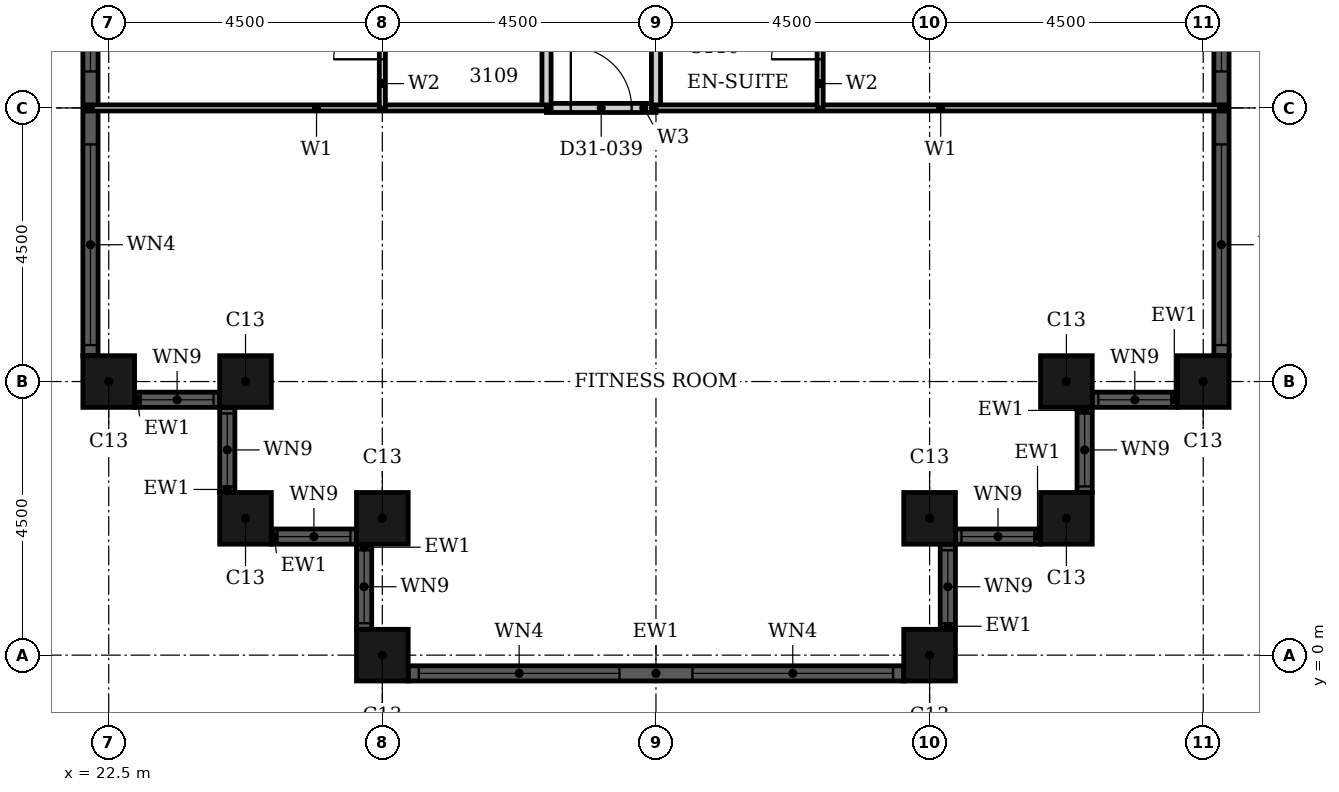
"""IFC4 building model, lengths in metres.
Left out: names, types, materials, properties, quantities, classifications, styles, units other than length and angle.
Written with IfcOpenShell. Run it as: python <this file> out.ifc"""

import sys

from ifc_helpers import new_model, si_unit, direction, frame, frame_2d, origin, origin_2d, place, context, subcontext, project, spatial, rectangle, hollow_rectangle, extrude, element, fill, save


model = new_model("IFC4")
c1 = context("Model", 3, precision=1e-05, world=origin(), true_north=direction((0.0, 1.0)))
c2 = subcontext(c1, "Body", "Model", "MODEL_VIEW")
j1 = project(units=[si_unit("LENGTHUNIT", "METRE"), si_unit("PLANEANGLEUNIT", "RADIAN")], contexts=[c1])
p1 = place(None, origin())
s1 = spatial("IfcSite", under=j1, at=p1, CompositionType="ELEMENT")
p2 = place(p1, origin())
s2 = spatial("IfcBuilding", under=s1, at=p2, CompositionType="ELEMENT")
p3 = place(p2, frame((0.0, 0.0, 126.0)))
s3 = spatial("IfcBuildingStorey", under=s2, at=p3, CompositionType="ELEMENT", Elevation=126.0)
for number, where, z_axis, x_axis in (
    (1, (22.5, 4.5, 0.0), (0.0, 0.0, 1.0), (1.0, 0.0, 0.0)),
    (2, (24.75, 4.5, 0.0), (0.0, 0.0, 1.0), (1.0, 0.0, 0.0)),
    (3, (24.75, 2.25, 0.0), (0.0, 0.0, 1.0), (1.0, 0.0, 0.0)),
    (4, (27.0, 2.25, 0.0), (0.0, 0.0, 1.0), (1.0, 0.0, 0.0)),
    (5, (27.0, 0.0, 0.0), (0.0, 0.0, 1.0), (1.0, 0.0, 0.0)),
    (6, (36.0, 0.0, 0.0), (0.0, 0.0, 1.0), (1.0, 0.0, 0.0)),
    (7, (36.0, 2.25, 0.0), (0.0, 0.0, 1.0), (1.0, 0.0, 0.0)),
    (8, (38.25, 2.25, 0.0), (0.0, 0.0, 1.0), (1.0, 0.0, 0.0)),
    (9, (38.25, 4.5, 0.0), (0.0, 0.0, 1.0), (1.0, 0.0, 0.0)),
    (10, (40.5, 4.5, 0.0), (0.0, 0.0, 1.0), (1.0, 0.0, 0.0)),
):
    element("IfcColumn", number, at=place(p3, frame(where, z_axis=z_axis, x_axis=x_axis)), inside=s3, PredefinedType="COLUMN", context=c2, shape_type="SweptSolid", body=[
        extrude(hollow_rectangle(XDim=0.85, YDim=0.85, WallThickness=0.026, at=origin_2d()), origin(), (0.0, 0.0, 1.0), 3.6),
    ])
p4 = place(p3, frame((22.925, 4.2, 0.0), z_axis=(0.0, 0.0, 1.0), x_axis=(1.0, 0.0, 0.0)))
e11 = element("IfcWall", 11, at=p4, inside=s3, PredefinedType="SOLIDWALL", context=c2, shape_type="SweptSolid", body=[
    extrude(rectangle(XDim=1.4, YDim=0.25, at=frame_2d((0.7, 0.0))), origin(), (0.0, 0.0, 1.0), 3.6),
])
p5 = place(p4, frame((0.1, 0.0, 0.9)))
e12 = element("IfcOpeningElement", 12, at=p5, cuts=e11, PredefinedType="OPENING", context=c2, shape_type="SweptSolid", body=[
    extrude(rectangle(XDim=1.2, YDim=2.08, at=frame_2d((0.6, 1.04))), frame((0.0, 0.135, 0.0), z_axis=(0.0, -1.0, 0.0), x_axis=(1.0, 0.0, 0.0)), (0.0, 0.0, 1.0), 0.27),
])
p6 = place(p3, frame((24.45, 4.075, 0.0), z_axis=(0.0, 0.0, 1.0), x_axis=(0.0, -1.0, 0.0)))
e13 = element("IfcWall", 13, at=p6, inside=s3, PredefinedType="SOLIDWALL", context=c2, shape_type="SweptSolid", body=[
    extrude(rectangle(XDim=1.4, YDim=0.25, at=frame_2d((0.7, 0.0))), origin(), (0.0, 0.0, 1.0), 3.6),
])
p7 = place(p6, frame((0.1, 0.0, 0.9)))
e14 = element("IfcOpeningElement", 14, at=p7, cuts=e13, PredefinedType="OPENING", context=c2, shape_type="SweptSolid", body=[
    extrude(rectangle(XDim=1.2, YDim=2.08, at=frame_2d((0.6, 1.04))), frame((0.0, 0.135, 0.0), z_axis=(0.0, -1.0, 0.0), x_axis=(1.0, 0.0, 0.0)), (0.0, 0.0, 1.0), 0.27),
])
p8 = place(p3, frame((25.175, 1.95, 0.0), z_axis=(0.0, 0.0, 1.0), x_axis=(1.0, 0.0, 0.0)))
e15 = element("IfcWall", 15, at=p8, inside=s3, PredefinedType="SOLIDWALL", context=c2, shape_type="SweptSolid", body=[
    extrude(rectangle(XDim=1.4, YDim=0.25, at=frame_2d((0.7, 0.0))), origin(), (0.0, 0.0, 1.0), 3.6),
])
p9 = place(p8, frame((0.1, 0.0, 0.9)))
e16 = element("IfcOpeningElement", 16, at=p9, cuts=e15, PredefinedType="OPENING", context=c2, shape_type="SweptSolid", body=[
    extrude(rectangle(XDim=1.2, YDim=2.08, at=frame_2d((0.6, 1.04))), frame((0.0, 0.135, 0.0), z_axis=(0.0, -1.0, 0.0), x_axis=(1.0, 0.0, 0.0)), (0.0, 0.0, 1.0), 0.27),
])
p10 = place(p3, frame((26.7, 1.825, 0.0), z_axis=(0.0, 0.0, 1.0), x_axis=(0.0, -1.0, 0.0)))
e17 = element("IfcWall", 17, at=p10, inside=s3, PredefinedType="SOLIDWALL", context=c2, shape_type="SweptSolid", body=[
    extrude(rectangle(XDim=1.4, YDim=0.25, at=frame_2d((0.7, 0.0))), origin(), (0.0, 0.0, 1.0), 3.6),
])
p11 = place(p10, frame((0.1, 0.0, 0.9)))
e18 = element("IfcOpeningElement", 18, at=p11, cuts=e17, PredefinedType="OPENING", context=c2, shape_type="SweptSolid", body=[
    extrude(rectangle(XDim=1.2, YDim=2.08, at=frame_2d((0.6, 1.04))), frame((0.0, 0.135, 0.0), z_axis=(0.0, -1.0, 0.0), x_axis=(1.0, 0.0, 0.0)), (0.0, 0.0, 1.0), 0.27),
])
p12 = place(p3, frame((27.425, -0.3, 0.0), z_axis=(0.0, 0.0, 1.0), x_axis=(1.0, 0.0, 0.0)))
e19 = element("IfcWall", 19, at=p12, inside=s3, PredefinedType="SOLIDWALL", context=c2, shape_type="SweptSolid", body=[
    extrude(rectangle(XDim=8.15, YDim=0.25, at=frame_2d((4.075, 0.0))), origin(), (0.0, 0.0, 1.0), 3.6),
])
p13 = place(p12, frame((0.175, 0.0, 0.9)))
e20 = element("IfcOpeningElement", 20, at=p13, cuts=e19, PredefinedType="OPENING", context=c2, shape_type="SweptSolid", body=[
    extrude(rectangle(XDim=3.3, YDim=2.08, at=frame_2d((1.65, 1.04))), frame((0.0, 0.135, 0.0), z_axis=(0.0, -1.0, 0.0), x_axis=(1.0, 0.0, 0.0)), (0.0, 0.0, 1.0), 0.27),
])
p14 = place(p12, frame((4.675, 0.0, 0.9)))
e21 = element("IfcOpeningElement", 21, at=p14, cuts=e19, PredefinedType="OPENING", context=c2, shape_type="SweptSolid", body=[
    extrude(rectangle(XDim=3.3, YDim=2.08, at=frame_2d((1.65, 1.04))), frame((0.0, 0.135, 0.0), z_axis=(0.0, -1.0, 0.0), x_axis=(1.0, 0.0, 0.0)), (0.0, 0.0, 1.0), 0.27),
])
p15 = place(p3, frame((36.3, 0.425, 0.0), z_axis=(0.0, 0.0, 1.0), x_axis=(0.0, 1.0, 0.0)))
e22 = element("IfcWall", 22, at=p15, inside=s3, PredefinedType="SOLIDWALL", context=c2, shape_type="SweptSolid", body=[
    extrude(rectangle(XDim=1.4, YDim=0.25, at=frame_2d((0.7, 0.0))), origin(), (0.0, 0.0, 1.0), 3.6),
])
p16 = place(p15, frame((0.1, 0.0, 0.9)))
e23 = element("IfcOpeningElement", 23, at=p16, cuts=e22, PredefinedType="OPENING", context=c2, shape_type="SweptSolid", body=[
    extrude(rectangle(XDim=1.2, YDim=2.08, at=frame_2d((0.6, 1.04))), frame((0.0, 0.135, 0.0), z_axis=(0.0, -1.0, 0.0), x_axis=(1.0, 0.0, 0.0)), (0.0, 0.0, 1.0), 0.27),
])
p17 = place(p3, frame((36.425, 1.95, 0.0), z_axis=(0.0, 0.0, 1.0), x_axis=(1.0, 0.0, 0.0)))
e24 = element("IfcWall", 24, at=p17, inside=s3, PredefinedType="SOLIDWALL", context=c2, shape_type="SweptSolid", body=[
    extrude(rectangle(XDim=1.4, YDim=0.25, at=frame_2d((0.7, 0.0))), origin(), (0.0, 0.0, 1.0), 3.6),
])
p18 = place(p17, frame((0.1, 0.0, 0.9)))
e25 = element("IfcOpeningElement", 25, at=p18, cuts=e24, PredefinedType="OPENING", context=c2, shape_type="SweptSolid", body=[
    extrude(rectangle(XDim=1.2, YDim=2.08, at=frame_2d((0.6, 1.04))), frame((0.0, 0.135, 0.0), z_axis=(0.0, -1.0, 0.0), x_axis=(1.0, 0.0, 0.0)), (0.0, 0.0, 1.0), 0.27),
])
p19 = place(p3, frame((38.55, 2.675, 0.0), z_axis=(0.0, 0.0, 1.0), x_axis=(0.0, 1.0, 0.0)))
e26 = element("IfcWall", 26, at=p19, inside=s3, PredefinedType="SOLIDWALL", context=c2, shape_type="SweptSolid", body=[
    extrude(rectangle(XDim=1.4, YDim=0.25, at=frame_2d((0.7, 0.0))), origin(), (0.0, 0.0, 1.0), 3.6),
])
p20 = place(p19, frame((0.1, 0.0, 0.9)))
e27 = element("IfcOpeningElement", 27, at=p20, cuts=e26, PredefinedType="OPENING", context=c2, shape_type="SweptSolid", body=[
    extrude(rectangle(XDim=1.2, YDim=2.08, at=frame_2d((0.6, 1.04))), frame((0.0, 0.135, 0.0), z_axis=(0.0, -1.0, 0.0), x_axis=(1.0, 0.0, 0.0)), (0.0, 0.0, 1.0), 0.27),
])
p21 = place(p3, frame((38.675, 4.2, 0.0), z_axis=(0.0, 0.0, 1.0), x_axis=(1.0, 0.0, 0.0)))
e28 = element("IfcWall", 28, at=p21, inside=s3, PredefinedType="SOLIDWALL", context=c2, shape_type="SweptSolid", body=[
    extrude(rectangle(XDim=1.4, YDim=0.25, at=frame_2d((0.7, 0.0))), origin(), (0.0, 0.0, 1.0), 3.6),
])
p22 = place(p21, frame((0.1, 0.0, 0.9)))
e29 = element("IfcOpeningElement", 29, at=p22, cuts=e28, PredefinedType="OPENING", context=c2, shape_type="SweptSolid", body=[
    extrude(rectangle(XDim=1.2, YDim=2.08, at=frame_2d((0.6, 1.04))), frame((0.0, 0.135, 0.0), z_axis=(0.0, -1.0, 0.0), x_axis=(1.0, 0.0, 0.0)), (0.0, 0.0, 1.0), 0.27),
])
p23 = place(p3, frame((40.8, 4.925, 0.0), z_axis=(0.0, 0.0, 1.0), x_axis=(0.0, 1.0, 0.0)))
e30 = element("IfcWall", 30, at=p23, inside=s3, PredefinedType="SOLIDWALL", context=c2, shape_type="SweptSolid", body=[
    extrude(rectangle(XDim=8.15, YDim=0.25, at=frame_2d((4.075, 0.0))), origin(), (0.0, 0.0, 1.0), 3.6),
])
p24 = place(p23, frame((0.175, 0.0, 0.9)))
e31 = element("IfcOpeningElement", 31, at=p24, cuts=e30, PredefinedType="OPENING", context=c2, shape_type="SweptSolid", body=[
    extrude(rectangle(XDim=3.3, YDim=2.08, at=frame_2d((1.65, 1.04))), frame((0.0, 0.135, 0.0), z_axis=(0.0, -1.0, 0.0), x_axis=(1.0, 0.0, 0.0)), (0.0, 0.0, 1.0), 0.27),
])
p25 = place(p23, frame((4.675, 0.0, 0.9)))
e32 = element("IfcOpeningElement", 32, at=p25, cuts=e30, PredefinedType="OPENING", context=c2, shape_type="SweptSolid", body=[
    extrude(rectangle(XDim=3.3, YDim=2.08, at=frame_2d((1.65, 1.04))), frame((0.0, 0.135, 0.0), z_axis=(0.0, -1.0, 0.0), x_axis=(1.0, 0.0, 0.0)), (0.0, 0.0, 1.0), 0.27),
])
p26 = place(p3, frame((22.2, 13.075, 0.0), z_axis=(0.0, 0.0, 1.0), x_axis=(0.0, -1.0, 0.0)))
e33 = element("IfcWall", 33, at=p26, inside=s3, PredefinedType="SOLIDWALL", context=c2, shape_type="SweptSolid", body=[
    extrude(rectangle(XDim=8.15, YDim=0.25, at=frame_2d((4.075, 0.0))), origin(), (0.0, 0.0, 1.0), 3.6),
])
p27 = place(p26, frame((0.175, 0.0, 0.9)))
e34 = element("IfcOpeningElement", 34, at=p27, cuts=e33, PredefinedType="OPENING", context=c2, shape_type="SweptSolid", body=[
    extrude(rectangle(XDim=3.3, YDim=2.08, at=frame_2d((1.65, 1.04))), frame((0.0, 0.135, 0.0), z_axis=(0.0, -1.0, 0.0), x_axis=(1.0, 0.0, 0.0)), (0.0, 0.0, 1.0), 0.27),
])
p28 = place(p26, frame((4.675, 0.0, 0.9)))
e35 = element("IfcOpeningElement", 35, at=p28, cuts=e33, PredefinedType="OPENING", context=c2, shape_type="SweptSolid", body=[
    extrude(rectangle(XDim=3.3, YDim=2.08, at=frame_2d((1.65, 1.04))), frame((0.0, 0.135, 0.0), z_axis=(0.0, -1.0, 0.0), x_axis=(1.0, 0.0, 0.0)), (0.0, 0.0, 1.0), 0.27),
])
p29 = place(p3, frame((29.7, 9.0, 0.0), z_axis=(0.0, 0.0, 1.0), x_axis=(1.0, 0.0, 0.0)))
e36 = element("IfcWall", 36, at=p29, inside=s3, PredefinedType="PARTITIONING", context=c2, shape_type="SweptSolid", body=[
    extrude(rectangle(XDim=1.8, YDim=0.15, at=frame_2d((0.9, 0.0))), origin(), (0.0, 0.0, 1.0), 3.3),
])
p30 = place(p29, frame((0.4, 0.0, 0.0)))
e37 = element("IfcOpeningElement", 37, at=p30, cuts=e36, PredefinedType="OPENING", context=c2, shape_type="SweptSolid", body=[
    extrude(rectangle(XDim=1.0, YDim=2.1, at=frame_2d((0.5, 1.05))), frame((0.0, 0.085, 0.0), z_axis=(0.0, -1.0, 0.0), x_axis=(1.0, 0.0, 0.0)), (0.0, 0.0, 1.0), 0.17),
])
p31 = place(p3, frame((29.7, 9.0, 0.0), z_axis=(0.0, 0.0, 1.0), x_axis=(0.0, 1.0, 0.0)))
e38 = element("IfcWall", 38, at=p31, inside=s3, PredefinedType="PARTITIONING", context=c2, shape_type="SweptSolid", body=[
    extrude(rectangle(XDim=11.7, YDim=0.15, at=frame_2d((5.85, 0.0))), origin(), (0.0, 0.0, 1.0), 3.3),
])
p32 = place(p31, frame((2.95, 0.0, 0.0)))
e39 = element("IfcOpeningElement", 39, at=p32, cuts=e38, PredefinedType="OPENING", context=c2, shape_type="SweptSolid", body=[
    extrude(rectangle(XDim=1.0, YDim=2.1, at=frame_2d((0.5, 1.05))), frame((0.0, 0.085, 0.0), z_axis=(0.0, -1.0, 0.0), x_axis=(1.0, 0.0, 0.0)), (0.0, 0.0, 1.0), 0.17),
])
p33 = place(p3, frame((31.5, 9.0, 0.0), z_axis=(0.0, 0.0, 1.0), x_axis=(0.0, 1.0, 0.0)))
e40 = element("IfcWall", 40, at=p33, inside=s3, PredefinedType="PARTITIONING", context=c2, shape_type="SweptSolid", body=[
    extrude(rectangle(XDim=11.7, YDim=0.15, at=frame_2d((5.85, 0.0))), origin(), (0.0, 0.0, 1.0), 2.58),
])
p34 = place(p33, frame((2.95, 0.0, 0.0)))
e41 = element("IfcOpeningElement", 41, at=p34, cuts=e40, PredefinedType="OPENING", context=c2, shape_type="SweptSolid", body=[
    extrude(rectangle(XDim=1.0, YDim=2.1, at=frame_2d((0.5, 1.05))), frame((0.0, 0.085, 0.0), z_axis=(0.0, -1.0, 0.0), x_axis=(1.0, 0.0, 0.0)), (0.0, 0.0, 1.0), 0.17),
])
p35 = place(p3, frame((31.5, 9.0, 0.0), z_axis=(0.0, 0.0, 1.0), x_axis=(1.0, 0.0, 0.0)))
e42 = element("IfcWall", 42, at=p35, inside=s3, PredefinedType="PARTITIONING", context=c2, shape_type="SweptSolid", body=[
    extrude(rectangle(XDim=9.365, YDim=0.1, at=frame_2d((4.683, 0.0))), origin(), (0.0, 0.0, 1.0), 3.3),
])
p36 = place(p3, frame((22.135, 9.0, 0.0), z_axis=(0.0, 0.0, 1.0), x_axis=(1.0, 0.0, 0.0)))
e43 = element("IfcWall", 43, at=p36, inside=s3, PredefinedType="PARTITIONING", context=c2, shape_type="SweptSolid", body=[
    extrude(rectangle(XDim=7.565, YDim=0.1, at=frame_2d((3.782, 0.0))), origin(), (0.0, 0.0, 1.0), 3.3),
])
p37 = place(p3, frame((27.0, 9.0, 0.0), z_axis=(0.0, 0.0, 1.0), x_axis=(0.0, 1.0, 0.0)))
e44 = element("IfcWall", 44, at=p37, inside=s3, PredefinedType="PARTITIONING", context=c2, shape_type="SweptSolid", body=[
    extrude(rectangle(XDim=2.4, YDim=0.1, at=frame_2d((1.2, 0.0))), origin(), (0.0, 0.0, 1.0), 2.58),
])
p38 = place(p37, frame((0.8, 0.0, 0.0)))
e45 = element("IfcOpeningElement", 45, at=p38, cuts=e44, PredefinedType="OPENING", context=c2, shape_type="SweptSolid", body=[
    extrude(rectangle(XDim=0.8, YDim=2.1, at=frame_2d((0.4, 1.05))), frame((0.0, 0.06, 0.0), z_axis=(0.0, -1.0, 0.0), x_axis=(1.0, 0.0, 0.0)), (0.0, 0.0, 1.0), 0.12),
])
p39 = place(p3, frame((34.2, 9.0, 0.0), z_axis=(0.0, 0.0, 1.0), x_axis=(0.0, 1.0, 0.0)))
e46 = element("IfcWall", 46, at=p39, inside=s3, PredefinedType="PARTITIONING", context=c2, shape_type="SweptSolid", body=[
    extrude(rectangle(XDim=2.4, YDim=0.1, at=frame_2d((1.2, 0.0))), origin(), (0.0, 0.0, 1.0), 3.3),
])
p40 = place(p39, frame((0.8, 0.0, 0.0)))
e47 = element("IfcOpeningElement", 47, at=p40, cuts=e46, PredefinedType="OPENING", context=c2, shape_type="SweptSolid", body=[
    extrude(rectangle(XDim=0.8, YDim=2.1, at=frame_2d((0.4, 1.05))), frame((0.0, 0.06, 0.0), z_axis=(0.0, -1.0, 0.0), x_axis=(1.0, 0.0, 0.0)), (0.0, 0.0, 1.0), 0.12),
])
p41 = place(p5, origin())
e48 = element("IfcWindow", 48, at=p41, inside=s3, PartitioningType="SINGLE_PANEL", PredefinedType="WINDOW", context=c2, shape_type="SweptSolid", body=[
    extrude(rectangle(XDim=1.2, YDim=2.08, at=frame_2d((0.6, 1.04))), frame((0.0, 0.03, 0.0), z_axis=(0.0, -1.0, 0.0), x_axis=(1.0, 0.0, 0.0)), (0.0, 0.0, 1.0), 0.06),
])
fill(e12, e48)
p42 = place(p7, origin())
e49 = element("IfcWindow", 49, at=p42, inside=s3, PartitioningType="SINGLE_PANEL", PredefinedType="WINDOW", context=c2, shape_type="SweptSolid", body=[
    extrude(rectangle(XDim=1.2, YDim=2.08, at=frame_2d((0.6, 1.04))), frame((0.0, 0.03, 0.0), z_axis=(0.0, -1.0, 0.0), x_axis=(1.0, 0.0, 0.0)), (0.0, 0.0, 1.0), 0.06),
])
fill(e14, e49)
p43 = place(p9, origin())
e50 = element("IfcWindow", 50, at=p43, inside=s3, PartitioningType="SINGLE_PANEL", PredefinedType="WINDOW", context=c2, shape_type="SweptSolid", body=[
    extrude(rectangle(XDim=1.2, YDim=2.08, at=frame_2d((0.6, 1.04))), frame((0.0, 0.03, 0.0), z_axis=(0.0, -1.0, 0.0), x_axis=(1.0, 0.0, 0.0)), (0.0, 0.0, 1.0), 0.06),
])
fill(e16, e50)
p44 = place(p11, origin())
e51 = element("IfcWindow", 51, at=p44, inside=s3, PartitioningType="SINGLE_PANEL", PredefinedType="WINDOW", context=c2, shape_type="SweptSolid", body=[
    extrude(rectangle(XDim=1.2, YDim=2.08, at=frame_2d((0.6, 1.04))), frame((0.0, 0.03, 0.0), z_axis=(0.0, -1.0, 0.0), x_axis=(1.0, 0.0, 0.0)), (0.0, 0.0, 1.0), 0.06),
])
fill(e18, e51)
p45 = place(p13, origin())
e52 = element("IfcWindow", 52, at=p45, inside=s3, PartitioningType="SINGLE_PANEL", PredefinedType="WINDOW", context=c2, shape_type="SweptSolid", body=[
    extrude(rectangle(XDim=3.3, YDim=2.08, at=frame_2d((1.65, 1.04))), frame((0.0, 0.03, 0.0), z_axis=(0.0, -1.0, 0.0), x_axis=(1.0, 0.0, 0.0)), (0.0, 0.0, 1.0), 0.06),
])
fill(e20, e52)
p46 = place(p14, origin())
e53 = element("IfcWindow", 53, at=p46, inside=s3, PartitioningType="SINGLE_PANEL", PredefinedType="WINDOW", context=c2, shape_type="SweptSolid", body=[
    extrude(rectangle(XDim=3.3, YDim=2.08, at=frame_2d((1.65, 1.04))), frame((0.0, 0.03, 0.0), z_axis=(0.0, -1.0, 0.0), x_axis=(1.0, 0.0, 0.0)), (0.0, 0.0, 1.0), 0.06),
])
fill(e21, e53)
p47 = place(p16, origin())
e54 = element("IfcWindow", 54, at=p47, inside=s3, PartitioningType="SINGLE_PANEL", PredefinedType="WINDOW", context=c2, shape_type="SweptSolid", body=[
    extrude(rectangle(XDim=1.2, YDim=2.08, at=frame_2d((0.6, 1.04))), frame((0.0, 0.03, 0.0), z_axis=(0.0, -1.0, 0.0), x_axis=(1.0, 0.0, 0.0)), (0.0, 0.0, 1.0), 0.06),
])
fill(e23, e54)
p48 = place(p18, origin())
e55 = element("IfcWindow", 55, at=p48, inside=s3, PartitioningType="SINGLE_PANEL", PredefinedType="WINDOW", context=c2, shape_type="SweptSolid", body=[
    extrude(rectangle(XDim=1.2, YDim=2.08, at=frame_2d((0.6, 1.04))), frame((0.0, 0.03, 0.0), z_axis=(0.0, -1.0, 0.0), x_axis=(1.0, 0.0, 0.0)), (0.0, 0.0, 1.0), 0.06),
])
fill(e25, e55)
p49 = place(p20, origin())
e56 = element("IfcWindow", 56, at=p49, inside=s3, PartitioningType="SINGLE_PANEL", PredefinedType="WINDOW", context=c2, shape_type="SweptSolid", body=[
    extrude(rectangle(XDim=1.2, YDim=2.08, at=frame_2d((0.6, 1.04))), frame((0.0, 0.03, 0.0), z_axis=(0.0, -1.0, 0.0), x_axis=(1.0, 0.0, 0.0)), (0.0, 0.0, 1.0), 0.06),
])
fill(e27, e56)
p50 = place(p22, origin())
e57 = element("IfcWindow", 57, at=p50, inside=s3, PartitioningType="SINGLE_PANEL", PredefinedType="WINDOW", context=c2, shape_type="SweptSolid", body=[
    extrude(rectangle(XDim=1.2, YDim=2.08, at=frame_2d((0.6, 1.04))), frame((0.0, 0.03, 0.0), z_axis=(0.0, -1.0, 0.0), x_axis=(1.0, 0.0, 0.0)), (0.0, 0.0, 1.0), 0.06),
])
fill(e29, e57)
p51 = place(p24, origin())
e58 = element("IfcWindow", 58, at=p51, inside=s3, PartitioningType="SINGLE_PANEL", PredefinedType="WINDOW", context=c2, shape_type="SweptSolid", body=[
    extrude(rectangle(XDim=3.3, YDim=2.08, at=frame_2d((1.65, 1.04))), frame((0.0, 0.03, 0.0), z_axis=(0.0, -1.0, 0.0), x_axis=(1.0, 0.0, 0.0)), (0.0, 0.0, 1.0), 0.06),
])
fill(e31, e58)
p52 = place(p25, origin())
e59 = element("IfcWindow", 59, at=p52, inside=s3, PartitioningType="SINGLE_PANEL", PredefinedType="WINDOW", context=c2, shape_type="SweptSolid", body=[
    extrude(rectangle(XDim=3.3, YDim=2.08, at=frame_2d((1.65, 1.04))), frame((0.0, 0.03, 0.0), z_axis=(0.0, -1.0, 0.0), x_axis=(1.0, 0.0, 0.0)), (0.0, 0.0, 1.0), 0.06),
])
fill(e32, e59)
p53 = place(p27, origin())
e60 = element("IfcWindow", 60, at=p53, inside=s3, PartitioningType="SINGLE_PANEL", PredefinedType="WINDOW", context=c2, shape_type="SweptSolid", body=[
    extrude(rectangle(XDim=3.3, YDim=2.08, at=frame_2d((1.65, 1.04))), frame((0.0, 0.03, 0.0), z_axis=(0.0, -1.0, 0.0), x_axis=(1.0, 0.0, 0.0)), (0.0, 0.0, 1.0), 0.06),
])
fill(e34, e60)
p54 = place(p28, origin())
e61 = element("IfcWindow", 61, at=p54, inside=s3, PartitioningType="SINGLE_PANEL", PredefinedType="WINDOW", context=c2, shape_type="SweptSolid", body=[
    extrude(rectangle(XDim=3.3, YDim=2.08, at=frame_2d((1.65, 1.04))), frame((0.0, 0.03, 0.0), z_axis=(0.0, -1.0, 0.0), x_axis=(1.0, 0.0, 0.0)), (0.0, 0.0, 1.0), 0.06),
])
fill(e35, e61)
p55 = place(p38, origin())
e62 = element("IfcDoor", 62, at=p55, inside=s3, OperationType="SINGLE_SWING_LEFT", PredefinedType="DOOR", context=c2, shape_type="SweptSolid", body=[
    extrude(rectangle(XDim=0.8, YDim=2.1, at=frame_2d((0.4, 1.05))), frame((0.0, 0.025, 0.0), z_axis=(0.0, -1.0, 0.0), x_axis=(1.0, 0.0, 0.0)), (0.0, 0.0, 1.0), 0.05),
])
fill(e45, e62)
p56 = place(p40, origin())
e63 = element("IfcDoor", 63, at=p56, inside=s3, OperationType="SINGLE_SWING_RIGHT", PredefinedType="DOOR", context=c2, shape_type="SweptSolid", body=[
    extrude(rectangle(XDim=0.8, YDim=2.1, at=frame_2d((0.4, 1.05))), frame((0.0, 0.025, 0.0), z_axis=(0.0, -1.0, 0.0), x_axis=(1.0, 0.0, 0.0)), (0.0, 0.0, 1.0), 0.05),
])
fill(e47, e63)
p57 = place(p30, origin())
e64 = element("IfcDoor", 64, at=p57, inside=s3, OperationType="SINGLE_SWING_LEFT", PredefinedType="DOOR", context=c2, shape_type="SweptSolid", body=[
    extrude(rectangle(XDim=1.0, YDim=2.1, at=frame_2d((0.5, 1.05))), frame((0.0, 0.025, 0.0), z_axis=(0.0, -1.0, 0.0), x_axis=(1.0, 0.0, 0.0)), (0.0, 0.0, 1.0), 0.05),
])
fill(e37, e64)
save(model, sys.argv[1])
